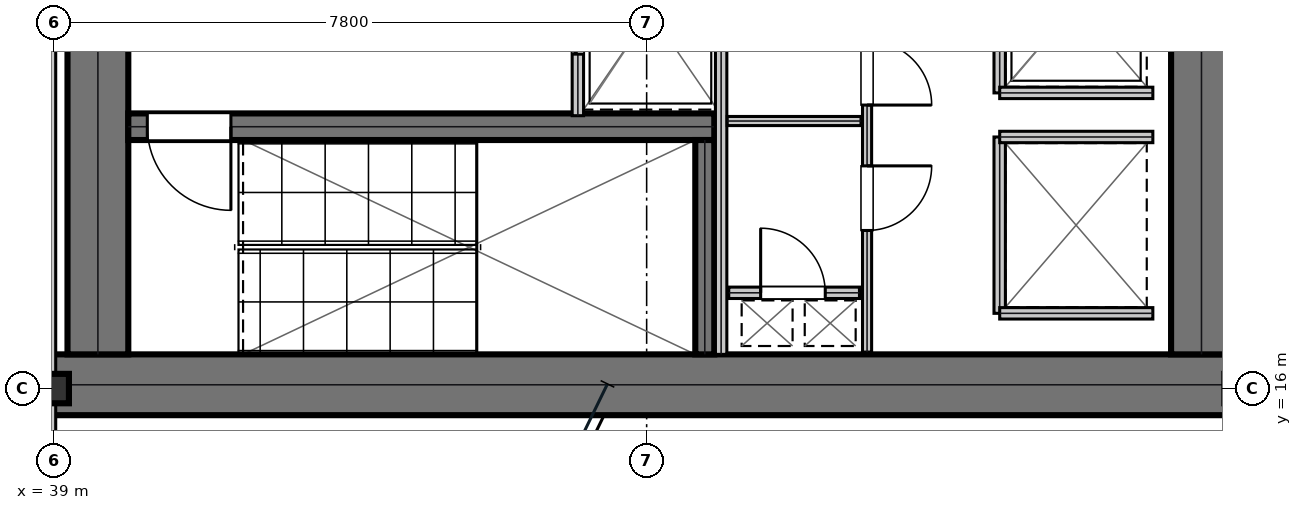
"""IFC4 building model, lengths in metres.
Left out: names, types, materials, properties, quantities, classifications, styles, units other than length and angle.
Written with IfcOpenShell. Run it as: python <this file> out.ifc"""

import sys

from ifc_helpers import new_model, si_unit, direction, frame, frame_2d, origin, origin_2d, place, context, subcontext, project, spatial, rectangle, i_section, extrude, element, fill, save


model = new_model("IFC4")
c1 = context("Model", 3, precision=1e-05, world=origin(), true_north=direction((0.0, 1.0)))
c2 = subcontext(c1, "Body", "Model", "MODEL_VIEW")
j1 = project(units=[si_unit("LENGTHUNIT", "METRE"), si_unit("PLANEANGLEUNIT", "RADIAN")], contexts=[c1])
p1 = place(None, origin())
s1 = spatial("IfcSite", under=j1, at=p1, CompositionType="ELEMENT")
p2 = place(p1, origin())
s2 = spatial("IfcBuilding", under=s1, at=p2, CompositionType="ELEMENT")
p3 = place(p2, frame((0.0, 0.0, 120.9)))
s3 = spatial("IfcBuildingStorey", under=s2, at=p3, CompositionType="ELEMENT", Elevation=120.9)
p4 = place(p3, frame((38.8, 16.05, 0.0), z_axis=(0.0, 0.0, 1.0), x_axis=(1.0, 0.0, 0.0)))
e1 = element("IfcWall", 1, at=p4, inside=s3, PredefinedType="SHEAR", context=c2, shape_type="SweptSolid", body=[
    extrude(rectangle(XDim=16.0, YDim=0.8, at=frame_2d((8.0, 0.0))), origin(), (0.0, 0.0, 1.0), 3.81),
])
p5 = place(p3, frame((39.58, 16.45, 0.0), z_axis=(0.0, 0.0, 1.0), x_axis=(0.0, 1.0, 0.0)))
e2 = element("IfcWall", 2, at=p5, inside=s3, PredefinedType="SHEAR", context=c2, shape_type="SweptSolid", body=[
    extrude(rectangle(XDim=6.15, YDim=0.8, at=frame_2d((3.075, 0.0))), origin(), (0.0, 0.0, 1.0), 3.81),
])
p6 = place(p3, frame((54.1, 16.45, 0.0), z_axis=(0.0, 0.0, 1.0), x_axis=(0.0, 1.0, 0.0)))
e3 = element("IfcWall", 3, at=p6, inside=s3, PredefinedType="SHEAR", context=c2, shape_type="SweptSolid", body=[
    extrude(rectangle(XDim=15.1, YDim=0.8, at=frame_2d((7.55, 0.0))), origin(), (0.0, 0.0, 1.0), 3.81),
])
p7 = place(p3, frame((39.98, 19.445, 0.0), z_axis=(0.0, 0.0, 1.0), x_axis=(1.0, 0.0, 0.0)))
e4 = element("IfcWall", 4, at=p7, inside=s3, PredefinedType="SHEAR", context=c2, shape_type="SweptSolid", body=[
    extrude(rectangle(XDim=7.71, YDim=0.35, at=frame_2d((3.855, 0.0))), origin(), (0.0, 0.0, 1.0), 3.81),
])
p8 = place(p7, frame((0.25, 0.0, 0.0)))
e5 = element("IfcOpeningElement", 5, at=p8, cuts=e4, PredefinedType="OPENING", context=c2, shape_type="SweptSolid", body=[
    extrude(rectangle(XDim=1.1, YDim=2.15, at=frame_2d((0.55, 1.075))), frame((0.0, 0.185, 0.0), z_axis=(0.0, -1.0, 0.0), x_axis=(1.0, 0.0, 0.0)), (0.0, 0.0, 1.0), 0.37),
])
p9 = place(p3, frame((47.565, 16.45, 0.0), z_axis=(0.0, 0.0, 1.0), x_axis=(0.0, 1.0, 0.0)))
e6 = element("IfcWall", 6, at=p9, inside=s3, PredefinedType="SHEAR", context=c2, shape_type="SweptSolid", body=[
    extrude(rectangle(XDim=2.82, YDim=0.25, at=frame_2d((1.41, 0.0))), origin(), (0.0, 0.0, 1.0), 3.81),
])
p10 = place(p3, frame((39.0, 16.0, 0.0), z_axis=(0.0, 0.0, 1.0), x_axis=(1.0, 0.0, 0.0)))
e7 = element("IfcColumn", 7, at=p10, inside=s3, PredefinedType="COLUMN", context=c2, shape_type="SweptSolid", body=[
    extrude(i_section(OverallWidth=0.398, OverallDepth=0.387, WebThickness=0.021, FlangeThickness=0.033, at=origin_2d()), origin(), (0.0, 0.0, 1.0), 4.044),
])
p11 = place(p3, frame((45.895, 19.59, 0.0), z_axis=(0.0, 0.0, 1.0), x_axis=(0.0, 1.0, 0.0)))
e8 = element("IfcWall", 8, at=p11, inside=s3, PredefinedType="PARTITIONING", context=c2, shape_type="SweptSolid", body=[
    extrude(rectangle(XDim=2.72, YDim=0.15, at=frame_2d((1.36, 0.0))), origin(), (0.0, 0.0, 1.0), 3.81),
])
p12 = place(p11, frame((0.81, 0.0, 0.0)))
e9 = element("IfcOpeningElement", 9, at=p12, cuts=e8, PredefinedType="OPENING", context=c2, shape_type="SweptSolid", body=[
    extrude(rectangle(XDim=1.1, YDim=2.15, at=frame_2d((0.55, 1.075))), frame((0.0, 0.085, 0.0), z_axis=(0.0, -1.0, 0.0), x_axis=(1.0, 0.0, 0.0)), (0.0, 0.0, 1.0), 0.17),
])
p13 = place(p3, frame((51.445, 19.89, 0.0), z_axis=(0.0, 0.0, 1.0), x_axis=(0.0, 1.0, 0.0)))
e10 = element("IfcWall", 10, at=p13, inside=s3, PredefinedType="PARTITIONING", context=c2, shape_type="SweptSolid", body=[
    extrude(rectangle(XDim=2.32, YDim=0.15, at=frame_2d((1.16, 0.0))), origin(), (0.0, 0.0, 1.0), 3.81),
])
p14 = place(p13, frame((0.61, 0.0, 0.0)))
e11 = element("IfcOpeningElement", 11, at=p14, cuts=e10, PredefinedType="OPENING", context=c2, shape_type="SweptSolid", body=[
    extrude(rectangle(XDim=1.1, YDim=2.15, at=frame_2d((0.55, 1.075))), frame((0.0, 0.085, 0.0), z_axis=(0.0, -1.0, 0.0), x_axis=(1.0, 0.0, 0.0)), (0.0, 0.0, 1.0), 0.17),
])
p15 = place(p3, frame((51.445, 19.89, 0.0), z_axis=(0.0, 0.0, 1.0), x_axis=(1.0, 0.0, 0.0)))
e12 = element("IfcWall", 12, at=p15, inside=s3, PredefinedType="PARTITIONING", context=c2, shape_type="SweptSolid", body=[
    extrude(rectangle(XDim=2.015, YDim=0.15, at=frame_2d((1.007, 0.0))), origin(), (0.0, 0.0, 1.0), 3.81),
])
p16 = place(p3, frame((51.445, 16.99, 0.0), z_axis=(0.0, 0.0, 1.0), x_axis=(0.0, 1.0, 0.0)))
e13 = element("IfcWall", 13, at=p16, inside=s3, PredefinedType="PARTITIONING", context=c2, shape_type="SweptSolid", body=[
    extrude(rectangle(XDim=2.32, YDim=0.15, at=frame_2d((1.16, 0.0))), origin(), (0.0, 0.0, 1.0), 3.81),
])
for number, where, z_axis, x_axis in (
    (14, (51.445, 16.99, 0.0), (0.0, 0.0, 1.0), (1.0, 0.0, 0.0)),
    (15, (51.445, 19.31, 0.0), (0.0, 0.0, 1.0), (1.0, 0.0, 0.0)),
):
    element("IfcWall", number, at=place(p3, frame(where, z_axis=z_axis, x_axis=x_axis)), inside=s3, PredefinedType="PARTITIONING", context=c2, shape_type="SweptSolid", body=[
        extrude(rectangle(XDim=2.015, YDim=0.15, at=frame_2d((1.007, 0.0))), origin(), (0.0, 0.0, 1.0), 3.81),
    ])
p17 = place(p3, frame((47.88, 17.26, 0.0), z_axis=(0.0, 0.0, 1.0), x_axis=(1.0, 0.0, 0.0)))
e16 = element("IfcWall", 16, at=p17, inside=s3, PredefinedType="PARTITIONING", context=c2, shape_type="SweptSolid", body=[
    extrude(rectangle(XDim=1.72, YDim=0.15, at=frame_2d((0.86, 0.0))), origin(), (0.0, 0.0, 1.0), 3.81),
])
p18 = place(p17, frame((0.42, 0.0, 0.0)))
e17 = element("IfcOpeningElement", 17, at=p18, cuts=e16, PredefinedType="OPENING", context=c2, shape_type="SweptSolid", body=[
    extrude(rectangle(XDim=0.85, YDim=2.15, at=frame_2d((0.425, 1.075))), frame((0.0, 0.085, 0.0), z_axis=(0.0, -1.0, 0.0), x_axis=(1.0, 0.0, 0.0)), (0.0, 0.0, 1.0), 0.17),
])
p19 = place(p3, frame((47.78, 16.45, 0.0), z_axis=(0.0, 0.0, 1.0), x_axis=(0.0, 1.0, 0.0)))
e18 = element("IfcWall", 18, at=p19, inside=s3, PredefinedType="PARTITIONING", context=c2, shape_type="SweptSolid", body=[
    extrude(rectangle(XDim=5.975, YDim=0.15, at=frame_2d((2.988, 0.0))), origin(), (0.0, 0.0, 1.0), 3.81),
])
p20 = place(p3, frame((47.86, 19.52, 0.0), z_axis=(0.0, 0.0, 1.0), x_axis=(1.0, 0.0, 0.0)))
e19 = element("IfcWall", 19, at=p20, inside=s3, PredefinedType="PARTITIONING", context=c2, shape_type="SweptSolid", body=[
    extrude(rectangle(XDim=1.76, YDim=0.12, at=frame_2d((0.88, 0.0))), origin(), (0.0, 0.0, 1.0), 3.81),
])
p21 = place(p3, frame((49.7, 16.48, 0.0), z_axis=(0.0, 0.0, 1.0), x_axis=(0.0, 1.0, 0.0)))
e20 = element("IfcWall", 20, at=p21, inside=s3, PredefinedType="PARTITIONING", context=c2, shape_type="SweptSolid", body=[
    extrude(rectangle(XDim=5.945, YDim=0.12, at=frame_2d((2.973, 0.0))), origin(), (0.0, 0.0, 1.0), 3.81),
])
p22 = place(p21, frame((1.6, 0.0, 0.0)))
e21 = element("IfcOpeningElement", 21, at=p22, cuts=e20, PredefinedType="OPENING", context=c2, shape_type="SweptSolid", body=[
    extrude(rectangle(XDim=0.85, YDim=2.15, at=frame_2d((0.425, 1.075))), frame((0.0, 0.07, 0.0), z_axis=(0.0, -1.0, 0.0), x_axis=(1.0, 0.0, 0.0)), (0.0, 0.0, 1.0), 0.14),
])
p23 = place(p21, frame((3.25, 0.0, 0.0)))
e22 = element("IfcOpeningElement", 22, at=p23, cuts=e20, PredefinedType="OPENING", context=c2, shape_type="SweptSolid", body=[
    extrude(rectangle(XDim=0.85, YDim=2.15, at=frame_2d((0.425, 1.075))), frame((0.0, 0.07, 0.0), z_axis=(0.0, -1.0, 0.0), x_axis=(1.0, 0.0, 0.0)), (0.0, 0.0, 1.0), 0.14),
])
p24 = place(p21, frame((4.55, 0.0, 0.0)))
e23 = element("IfcOpeningElement", 23, at=p24, cuts=e20, PredefinedType="OPENING", context=c2, shape_type="SweptSolid", body=[
    extrude(rectangle(XDim=0.95, YDim=2.15, at=frame_2d((0.475, 1.075))), frame((0.0, 0.07, 0.0), z_axis=(0.0, -1.0, 0.0), x_axis=(1.0, 0.0, 0.0)), (0.0, 0.0, 1.0), 0.14),
])
p25 = place(p3, frame((38.95, 14.5, 0.0), z_axis=(0.0, 0.0, 1.0), x_axis=(0.0, 1.0, 0.0)))
e24 = element("IfcWall", 24, at=p25, inside=s3, PredefinedType="PARTITIONING", context=c2, shape_type="SweptSolid", body=[
    extrude(rectangle(XDim=8.2, YDim=0.15, at=frame_2d((4.1, 0.0))), origin(), (0.0, 0.0, 1.0), 3.19),
])
p26 = place(p12, frame((1.1, 0.0, 0.0), z_axis=(0.0, 0.0, 1.0), x_axis=(-1.0, 0.0, 0.0)))
e25 = element("IfcDoor", 25, at=p26, inside=s3, OperationType="DOUBLE_DOOR_SLIDING", PredefinedType="DOOR", context=c2, shape_type="SweptSolid", body=[
    extrude(rectangle(XDim=1.1, YDim=2.15, at=frame_2d((0.55, 1.075))), frame((0.0, 0.025, 0.0), z_axis=(0.0, -1.0, 0.0), x_axis=(1.0, 0.0, 0.0)), (0.0, 0.0, 1.0), 0.05),
])
fill(e9, e25)
p27 = place(p18, origin())
e26 = element("IfcDoor", 26, at=p27, inside=s3, OperationType="SINGLE_SWING_LEFT", PredefinedType="TRAPDOOR", context=c2, shape_type="SweptSolid", body=[
    extrude(rectangle(XDim=0.85, YDim=2.15, at=frame_2d((0.425, 1.075))), frame((0.0, 0.025, 0.0), z_axis=(0.0, -1.0, 0.0), x_axis=(1.0, 0.0, 0.0)), (0.0, 0.0, 1.0), 0.05),
])
fill(e17, e26)
p28 = place(p22, frame((0.85, 0.0, 0.0), z_axis=(0.0, 0.0, 1.0), x_axis=(-1.0, 0.0, 0.0)))
e27 = element("IfcDoor", 27, at=p28, inside=s3, OperationType="SINGLE_SWING_LEFT", PredefinedType="DOOR", context=c2, shape_type="SweptSolid", body=[
    extrude(rectangle(XDim=0.85, YDim=2.15, at=frame_2d((0.425, 1.075))), frame((0.0, 0.025, 0.0), z_axis=(0.0, -1.0, 0.0), x_axis=(1.0, 0.0, 0.0)), (0.0, 0.0, 1.0), 0.05),
])
fill(e21, e27)
p29 = place(p23, frame((0.85, 0.0, 0.0), z_axis=(0.0, 0.0, 1.0), x_axis=(-1.0, 0.0, 0.0)))
e28 = element("IfcDoor", 28, at=p29, inside=s3, OperationType="SINGLE_SWING_RIGHT", PredefinedType="DOOR", context=c2, shape_type="SweptSolid", body=[
    extrude(rectangle(XDim=0.85, YDim=2.15, at=frame_2d((0.425, 1.075))), frame((0.0, 0.025, 0.0), z_axis=(0.0, -1.0, 0.0), x_axis=(1.0, 0.0, 0.0)), (0.0, 0.0, 1.0), 0.05),
])
fill(e22, e28)
p30 = place(p8, frame((1.1, 0.0, 0.0), z_axis=(0.0, 0.0, 1.0), x_axis=(-1.0, 0.0, 0.0)))
e29 = element("IfcDoor", 29, at=p30, inside=s3, OperationType="SINGLE_SWING_LEFT", PredefinedType="DOOR", context=c2, shape_type="SweptSolid", body=[
    extrude(rectangle(XDim=1.1, YDim=2.15, at=frame_2d((0.55, 1.075))), frame((0.0, 0.025, 0.0), z_axis=(0.0, -1.0, 0.0), x_axis=(1.0, 0.0, 0.0)), (0.0, 0.0, 1.0), 0.05),
])
fill(e5, e29)
save(model, sys.argv[1])
